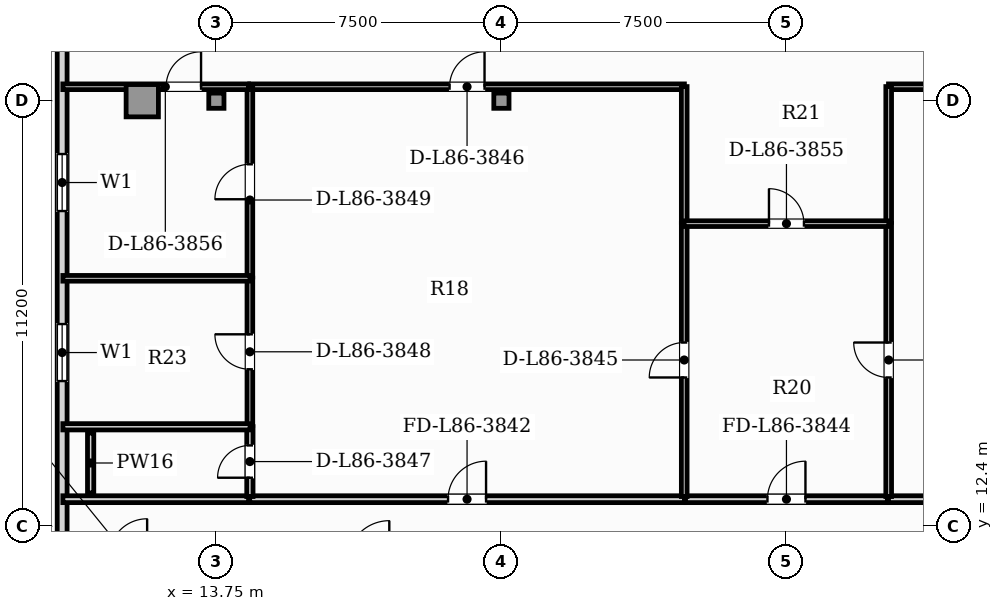
"""IFC4 building model, lengths in metres.
Left out: names, types, materials, properties, quantities, classifications, styles, units other than length and angle.
Written with IfcOpenShell. Run it as: python <this file> out.ifc"""

import sys

from ifc_helpers import new_model, si_unit, direction, frame, frame_2d, origin, origin_2d, place, context, subcontext, project, spatial, rectangle, hollow_rectangle, extrude, element, fill, save


model = new_model("IFC4")
c1 = context("Model", 3, precision=1e-05, world=origin(), true_north=direction((0.0, 1.0)))
c2 = subcontext(c1, "Body", "Model", "MODEL_VIEW")
j1 = project(units=[si_unit("LENGTHUNIT", "METRE"), si_unit("PLANEANGLEUNIT", "RADIAN")], contexts=[c1])
p1 = place(None, origin())
s1 = spatial("IfcSite", under=j1, at=p1, CompositionType="ELEMENT")
p2 = place(p1, origin())
s2 = spatial("IfcBuilding", under=s1, at=p2, CompositionType="ELEMENT")
p3 = place(p2, frame((0.0, 0.0, 349.05)))
s3 = spatial("IfcBuildingStorey", under=s2, at=p3, CompositionType="ELEMENT", Elevation=349.05)
p4 = place(p3, frame((11.8, 23.6, 0.0), z_axis=(0.0, 0.0, 1.0), x_axis=(1.0, 0.0, 0.0)))
e1 = element("IfcColumn", 1, at=p4, inside=s3, PredefinedType="USERDEFINED", context=c2, shape_type="SweptSolid", body=[
    extrude(hollow_rectangle(XDim=0.85, YDim=0.85, WallThickness=0.05, at=origin_2d()), origin(), (0.0, 0.0, 1.0), 4.4),
])
for number, where, z_axis, x_axis in (
    (2, (13.75, 23.6, 0.0), (0.0, 0.0, 1.0), (1.0, 0.0, 0.0)),
    (3, (21.25, 23.6, 0.0), (0.0, 0.0, 1.0), (1.0, 0.0, 0.0)),
):
    element("IfcColumn", number, at=place(p3, frame(where, z_axis=z_axis, x_axis=x_axis)), inside=s3, PredefinedType="COLUMN", context=c2, shape_type="SweptSolid", body=[
        extrude(hollow_rectangle(XDim=0.4, YDim=0.4, WallThickness=0.02, at=origin_2d()), origin(), (0.0, 0.0, 1.0), 4.4),
    ])
p5 = place(p3, frame((9.692, 27.997, 0.0), z_axis=(0.0, 0.0, 1.0), x_axis=(0.0, -1.0, 0.0)))
e4 = element("IfcWall", 4, at=p5, inside=s3, PredefinedType="SOLIDWALL", context=c2, shape_type="SweptSolid", body=[
    extrude(rectangle(XDim=24.757, YDim=0.26, at=frame_2d((12.378, 0.0))), origin(), (0.0, 0.0, 1.0), 4.14),
])
p6 = place(p5, frame((18.707, 0.0, 0.85)))
e5 = element("IfcOpeningElement", 5, at=p6, cuts=e4, PredefinedType="OPENING", context=c2, shape_type="SweptSolid", body=[
    extrude(rectangle(XDim=2.4, YDim=2.0, at=frame_2d((1.2, 1.0))), frame((0.0, 0.14, 0.0), z_axis=(0.0, -1.0, 0.0), x_axis=(1.0, 0.0, 0.0)), (0.0, 0.0, 1.0), 0.28),
])
p7 = place(p5, frame((10.273, 0.0, 0.9)))
e6 = element("IfcOpeningElement", 6, at=p7, cuts=e4, PredefinedType="OPENING", context=c2, shape_type="SweptSolid", body=[
    extrude(rectangle(XDim=1.5, YDim=1.95, at=frame_2d((0.75, 0.975))), frame((0.0, 0.14, 0.0), z_axis=(0.0, -1.0, 0.0), x_axis=(1.0, 0.0, 0.0)), (0.0, 0.0, 1.0), 0.28),
])
p8 = place(p5, frame((5.8, 0.0, 0.9)))
e7 = element("IfcOpeningElement", 7, at=p8, cuts=e4, PredefinedType="OPENING", context=c2, shape_type="SweptSolid", body=[
    extrude(rectangle(XDim=1.5, YDim=1.95, at=frame_2d((0.75, 0.975))), frame((0.0, 0.14, 0.0), z_axis=(0.0, -1.0, 0.0), x_axis=(1.0, 0.0, 0.0)), (0.0, 0.0, 1.0), 0.28),
])
p9 = place(p3, frame((14.627, 13.115, 0.0), z_axis=(0.0, 0.0, 1.0), x_axis=(1.0, 0.0, 0.0)))
e8 = element("IfcWall", 8, at=p9, inside=s3, PredefinedType="PARTITIONING", context=c2, shape_type="SweptSolid", body=[
    extrude(rectangle(XDim=11.438, YDim=0.18, at=frame_2d((5.719, 0.0))), origin(), (0.0, 0.0, 1.0), 4.14),
])
p10 = place(p9, frame((5.219, 0.0, 0.0)))
e9 = element("IfcOpeningElement", 9, at=p10, cuts=e8, PredefinedType="OPENING", context=c2, shape_type="SweptSolid", body=[
    extrude(rectangle(XDim=1.0, YDim=2.15, at=frame_2d((0.5, 1.075))), frame((0.0, 0.1, 0.0), z_axis=(0.0, -1.0, 0.0), x_axis=(1.0, 0.0, 0.0)), (0.0, 0.0, 1.0), 0.2),
])
p11 = place(p3, frame((31.435, 13.115, 0.0), z_axis=(0.0, 0.0, 1.0), x_axis=(1.0, 0.0, 0.0)))
e10 = element("IfcWall", 10, at=p11, inside=s3, PredefinedType="PARTITIONING", context=c2, shape_type="SweptSolid", body=[
    extrude(rectangle(XDim=11.438, YDim=0.18, at=frame_2d((5.719, 0.0))), origin(), (0.0, 0.0, 1.0), 4.14),
])
p12 = place(p11, frame((5.219, 0.0, 0.0)))
e11 = element("IfcOpeningElement", 11, at=p12, cuts=e10, PredefinedType="OPENING", context=c2, shape_type="SweptSolid", body=[
    extrude(rectangle(XDim=1.0, YDim=2.15, at=frame_2d((0.5, 1.075))), frame((0.0, 0.1, 0.0), z_axis=(0.0, -1.0, 0.0), x_axis=(1.0, 0.0, 0.0)), (0.0, 0.0, 1.0), 0.2),
])
p13 = place(p3, frame((26.095, 13.115, 0.0), z_axis=(0.0, 0.0, 1.0), x_axis=(1.0, 0.0, 0.0)))
e12 = element("IfcWall", 12, at=p13, inside=s3, PredefinedType="PARTITIONING", context=c2, shape_type="SweptSolid", body=[
    extrude(rectangle(XDim=5.31, YDim=0.18, at=frame_2d((2.655, 0.0))), origin(), (0.0, 0.0, 1.0), 4.14),
])
p14 = place(p13, frame((2.155, 0.0, 0.0)))
e13 = element("IfcOpeningElement", 13, at=p14, cuts=e12, PredefinedType="OPENING", context=c2, shape_type="SweptSolid", body=[
    extrude(rectangle(XDim=1.0, YDim=2.15, at=frame_2d((0.5, 1.075))), frame((0.0, 0.1, 0.0), z_axis=(0.0, -1.0, 0.0), x_axis=(1.0, 0.0, 0.0)), (0.0, 0.0, 1.0), 0.2),
])
p15 = place(p3, frame((9.711, 13.115, 0.0), z_axis=(0.0, 0.0, 1.0), x_axis=(1.0, 0.0, 0.0)))
e14 = element("IfcWall", 14, at=p15, inside=s3, PredefinedType="PARTITIONING", context=c2, shape_type="SweptSolid", body=[
    extrude(rectangle(XDim=4.885, YDim=0.18, at=frame_2d((2.443, 0.0))), origin(), (0.0, 0.0, 1.0), 4.14),
])
p16 = place(p3, frame((26.06, 13.185, 0.0), z_axis=(0.0, 0.0, 1.0), x_axis=(0.0, 1.0, 0.0)))
e15 = element("IfcWall", 15, at=p16, inside=s3, PredefinedType="PARTITIONING", context=c2, shape_type="SweptSolid", body=[
    extrude(rectangle(XDim=7.185, YDim=0.15, at=frame_2d((3.593, 0.0))), origin(), (0.0, 0.0, 1.0), 4.14),
])
p17 = place(p16, frame((3.133, 0.0, 0.0)))
e16 = element("IfcOpeningElement", 16, at=p17, cuts=e15, PredefinedType="OPENING", context=c2, shape_type="SweptSolid", body=[
    extrude(rectangle(XDim=0.92, YDim=2.1, at=frame_2d((0.46, 1.05))), frame((0.0, 0.085, 0.0), z_axis=(0.0, -1.0, 0.0), x_axis=(1.0, 0.0, 0.0)), (0.0, 0.0, 1.0), 0.17),
])
p18 = place(p3, frame((14.627, 23.967, 0.0), z_axis=(0.0, 0.0, 1.0), x_axis=(1.0, 0.0, 0.0)))
e17 = element("IfcWall", 17, at=p18, inside=s3, PredefinedType="PARTITIONING", context=c2, shape_type="SweptSolid", body=[
    extrude(rectangle(XDim=11.438, YDim=0.15, at=frame_2d((5.719, 0.0))), origin(), (0.0, 0.0, 1.0), 4.14),
])
p19 = place(p18, frame((5.259, 0.0, 0.0)))
e18 = element("IfcOpeningElement", 18, at=p19, cuts=e17, PredefinedType="OPENING", context=c2, shape_type="SweptSolid", body=[
    extrude(rectangle(XDim=0.92, YDim=2.1, at=frame_2d((0.46, 1.05))), frame((0.0, 0.085, 0.0), z_axis=(0.0, -1.0, 0.0), x_axis=(1.0, 0.0, 0.0)), (0.0, 0.0, 1.0), 0.17),
])
p20 = place(p3, frame((26.06, 20.4, 0.0), z_axis=(0.0, 0.0, 1.0), x_axis=(0.0, 1.0, 0.0)))
e19 = element("IfcWall", 19, at=p20, inside=s3, PredefinedType="PARTITIONING", context=c2, shape_type="SweptSolid", body=[
    extrude(rectangle(XDim=3.572, YDim=0.15, at=frame_2d((1.786, 0.0))), origin(), (0.0, 0.0, 1.0), 4.14),
])
p21 = place(p3, frame((14.632, 13.185, 0.0), z_axis=(0.0, 0.0, 1.0), x_axis=(0.0, 1.0, 0.0)))
e20 = element("IfcWall", 20, at=p21, inside=s3, PredefinedType="PLUMBINGWALL", context=c2, shape_type="SweptSolid", body=[
    extrude(rectangle(XDim=1.84, YDim=0.165, at=frame_2d((0.92, 0.0))), origin(), (0.0, 0.0, 1.0), 4.14),
])
p22 = place(p21, frame((0.495, 0.0, 0.0)))
e21 = element("IfcOpeningElement", 21, at=p22, cuts=e20, PredefinedType="OPENING", context=c2, shape_type="SweptSolid", body=[
    extrude(rectangle(XDim=0.85, YDim=2.1, at=frame_2d((0.425, 1.05))), frame((0.0, 0.093, 0.0), z_axis=(0.0, -1.0, 0.0), x_axis=(1.0, 0.0, 0.0)), (0.0, 0.0, 1.0), 0.185),
])
p23 = place(p3, frame((14.632, 15.055, 0.0), z_axis=(0.0, 0.0, 1.0), x_axis=(0.0, 1.0, 0.0)))
e22 = element("IfcWall", 22, at=p23, inside=s3, PredefinedType="PARTITIONING", context=c2, shape_type="SweptSolid", body=[
    extrude(rectangle(XDim=3.877, YDim=0.15, at=frame_2d((1.938, 0.0))), origin(), (0.0, 0.0, 1.0), 4.14),
])
p24 = place(p23, frame((1.479, 0.0, 0.0)))
e23 = element("IfcOpeningElement", 23, at=p24, cuts=e22, PredefinedType="OPENING", context=c2, shape_type="SweptSolid", body=[
    extrude(rectangle(XDim=0.92, YDim=2.1, at=frame_2d((0.46, 1.05))), frame((0.0, 0.085, 0.0), z_axis=(0.0, -1.0, 0.0), x_axis=(1.0, 0.0, 0.0)), (0.0, 0.0, 1.0), 0.17),
])
p25 = place(p3, frame((14.632, 18.962, 0.0), z_axis=(0.0, 0.0, 1.0), x_axis=(0.0, 1.0, 0.0)))
e24 = element("IfcWall", 24, at=p25, inside=s3, PredefinedType="PARTITIONING", context=c2, shape_type="SweptSolid", body=[
    extrude(rectangle(XDim=5.01, YDim=0.15, at=frame_2d((2.505, 0.0))), origin(), (0.0, 0.0, 1.0), 4.14),
])
p26 = place(p25, frame((2.045, 0.0, 0.0)))
e25 = element("IfcOpeningElement", 25, at=p26, cuts=e24, PredefinedType="OPENING", context=c2, shape_type="SweptSolid", body=[
    extrude(rectangle(XDim=0.92, YDim=2.1, at=frame_2d((0.46, 1.05))), frame((0.0, 0.085, 0.0), z_axis=(0.0, -1.0, 0.0), x_axis=(1.0, 0.0, 0.0)), (0.0, 0.0, 1.0), 0.17),
])
p27 = place(p3, frame((31.44, 13.185, 0.0), z_axis=(0.0, 0.0, 1.0), x_axis=(0.0, 1.0, 0.0)))
e26 = element("IfcWall", 26, at=p27, inside=s3, PredefinedType="PARTITIONING", context=c2, shape_type="SweptSolid", body=[
    extrude(rectangle(XDim=7.185, YDim=0.15, at=frame_2d((3.593, 0.0))), origin(), (0.0, 0.0, 1.0), 4.14),
])
p28 = place(p27, frame((3.133, 0.0, 0.0)))
e27 = element("IfcOpeningElement", 27, at=p28, cuts=e26, PredefinedType="OPENING", context=c2, shape_type="SweptSolid", body=[
    extrude(rectangle(XDim=0.92, YDim=2.1, at=frame_2d((0.46, 1.05))), frame((0.0, 0.085, 0.0), z_axis=(0.0, -1.0, 0.0), x_axis=(1.0, 0.0, 0.0)), (0.0, 0.0, 1.0), 0.17),
])
p29 = place(p3, frame((31.435, 23.967, 0.0), z_axis=(0.0, 0.0, 1.0), x_axis=(1.0, 0.0, 0.0)))
e28 = element("IfcWall", 28, at=p29, inside=s3, PredefinedType="PARTITIONING", context=c2, shape_type="SweptSolid", body=[
    extrude(rectangle(XDim=11.438, YDim=0.15, at=frame_2d((5.719, 0.0))), origin(), (0.0, 0.0, 1.0), 4.14),
])
p30 = place(p29, frame((5.259, 0.0, 0.0)))
e29 = element("IfcOpeningElement", 29, at=p30, cuts=e28, PredefinedType="OPENING", context=c2, shape_type="SweptSolid", body=[
    extrude(rectangle(XDim=0.92, YDim=2.1, at=frame_2d((0.46, 1.05))), frame((0.0, 0.085, 0.0), z_axis=(0.0, -1.0, 0.0), x_axis=(1.0, 0.0, 0.0)), (0.0, 0.0, 1.0), 0.17),
])
p31 = place(p3, frame((31.44, 20.4, 0.0), z_axis=(0.0, 0.0, 1.0), x_axis=(0.0, 1.0, 0.0)))
e30 = element("IfcWall", 30, at=p31, inside=s3, PredefinedType="PARTITIONING", context=c2, shape_type="SweptSolid", body=[
    extrude(rectangle(XDim=3.572, YDim=0.15, at=frame_2d((1.786, 0.0))), origin(), (0.0, 0.0, 1.0), 4.14),
])
p32 = place(p3, frame((26.055, 20.365, 0.0), z_axis=(0.0, 0.0, 1.0), x_axis=(1.0, 0.0, 0.0)))
e31 = element("IfcWall", 31, at=p32, inside=s3, PredefinedType="PARTITIONING", context=c2, shape_type="SweptSolid", body=[
    extrude(rectangle(XDim=5.39, YDim=0.15, at=frame_2d((2.695, 0.0))), origin(), (0.0, 0.0, 1.0), 4.14),
])
p33 = place(p32, frame((2.235, 0.0, 0.0)))
e32 = element("IfcOpeningElement", 32, at=p33, cuts=e31, PredefinedType="OPENING", context=c2, shape_type="SweptSolid", body=[
    extrude(rectangle(XDim=0.92, YDim=2.1, at=frame_2d((0.46, 1.05))), frame((0.0, 0.085, 0.0), z_axis=(0.0, -1.0, 0.0), x_axis=(1.0, 0.0, 0.0)), (0.0, 0.0, 1.0), 0.17),
])
p34 = place(p3, frame((9.711, 23.967, 0.0), z_axis=(0.0, 0.0, 1.0), x_axis=(1.0, 0.0, 0.0)))
e33 = element("IfcWall", 33, at=p34, inside=s3, PredefinedType="PARTITIONING", context=c2, shape_type="SweptSolid", body=[
    extrude(rectangle(XDim=4.885, YDim=0.15, at=frame_2d((2.443, 0.0))), origin(), (0.0, 0.0, 1.0), 4.14),
])
p35 = place(p34, frame((2.716, 0.0, 0.0)))
e34 = element("IfcOpeningElement", 34, at=p35, cuts=e33, PredefinedType="OPENING", context=c2, shape_type="SweptSolid", body=[
    extrude(rectangle(XDim=0.92, YDim=2.1, at=frame_2d((0.46, 1.05))), frame((0.0, 0.085, 0.0), z_axis=(0.0, -1.0, 0.0), x_axis=(1.0, 0.0, 0.0)), (0.0, 0.0, 1.0), 0.17),
])
p36 = place(p3, frame((9.711, 15.02, 0.0), z_axis=(0.0, 0.0, 1.0), x_axis=(1.0, 0.0, 0.0)))
e35 = element("IfcWall", 35, at=p36, inside=s3, PredefinedType="PLUMBINGWALL", context=c2, shape_type="SweptSolid", body=[
    extrude(rectangle(XDim=4.926, YDim=0.165, at=frame_2d((2.463, 0.0))), origin(), (0.0, 0.0, 1.0), 4.14),
])
p37 = place(p3, frame((9.711, 18.927, 0.0), z_axis=(0.0, 0.0, 1.0), x_axis=(1.0, 0.0, 0.0)))
e36 = element("IfcWall", 36, at=p37, inside=s3, PredefinedType="PARTITIONING", context=c2, shape_type="SweptSolid", body=[
    extrude(rectangle(XDim=4.926, YDim=0.15, at=frame_2d((2.463, 0.0))), origin(), (0.0, 0.0, 1.0), 4.14),
])
p38 = place(p3, frame((10.442, 13.28, 0.0), z_axis=(0.0, 0.0, 1.0), x_axis=(0.0, 1.0, 0.0)))
e37 = element("IfcWall", 37, at=p38, inside=s3, PredefinedType="PLUMBINGWALL", context=c2, shape_type="SweptSolid", body=[
    extrude(rectangle(XDim=1.575, YDim=0.165, at=frame_2d((0.788, 0.0))), origin(), (0.0, 0.0, 1.0), 4.14),
])
p39 = place(p7, origin())
e38 = element("IfcWindow", 38, at=p39, inside=s3, PartitioningType="SINGLE_PANEL", PredefinedType="WINDOW", context=c2, shape_type="SweptSolid", body=[
    extrude(rectangle(XDim=1.5, YDim=1.95, at=frame_2d((0.75, 0.975))), frame((0.0, 0.03, 0.0), z_axis=(0.0, -1.0, 0.0), x_axis=(1.0, 0.0, 0.0)), (0.0, 0.0, 1.0), 0.06),
])
fill(e6, e38)
p40 = place(p8, origin())
e39 = element("IfcWindow", 39, at=p40, inside=s3, PartitioningType="SINGLE_PANEL", PredefinedType="WINDOW", context=c2, shape_type="SweptSolid", body=[
    extrude(rectangle(XDim=1.5, YDim=1.95, at=frame_2d((0.75, 0.975))), frame((0.0, 0.03, 0.0), z_axis=(0.0, -1.0, 0.0), x_axis=(1.0, 0.0, 0.0)), (0.0, 0.0, 1.0), 0.06),
])
fill(e7, e39)
p41 = place(p10, origin())
e40 = element("IfcDoor", 40, at=p41, inside=s3, OperationType="SINGLE_SWING_RIGHT", PredefinedType="DOOR", context=c2, shape_type="SweptSolid", body=[
    extrude(rectangle(XDim=1.0, YDim=2.15, at=frame_2d((0.5, 1.075))), frame((0.0, 0.025, 0.0), z_axis=(0.0, -1.0, 0.0), x_axis=(1.0, 0.0, 0.0)), (0.0, 0.0, 1.0), 0.05),
])
fill(e9, e40)
p42 = place(p14, origin())
e41 = element("IfcDoor", 41, at=p42, inside=s3, OperationType="SINGLE_SWING_RIGHT", PredefinedType="DOOR", context=c2, shape_type="SweptSolid", body=[
    extrude(rectangle(XDim=1.0, YDim=2.15, at=frame_2d((0.5, 1.075))), frame((0.0, 0.025, 0.0), z_axis=(0.0, -1.0, 0.0), x_axis=(1.0, 0.0, 0.0)), (0.0, 0.0, 1.0), 0.05),
])
fill(e13, e41)
p43 = place(p17, origin())
e42 = element("IfcDoor", 42, at=p43, inside=s3, OperationType="SINGLE_SWING_LEFT", PredefinedType="DOOR", context=c2, shape_type="SweptSolid", body=[
    extrude(rectangle(XDim=0.92, YDim=2.1, at=frame_2d((0.46, 1.05))), frame((0.0, 0.025, 0.0), z_axis=(0.0, -1.0, 0.0), x_axis=(1.0, 0.0, 0.0)), (0.0, 0.0, 1.0), 0.05),
])
fill(e16, e42)
p44 = place(p19, origin())
e43 = element("IfcDoor", 43, at=p44, inside=s3, OperationType="SINGLE_SWING_RIGHT", PredefinedType="DOOR", context=c2, shape_type="SweptSolid", body=[
    extrude(rectangle(XDim=0.92, YDim=2.1, at=frame_2d((0.46, 1.05))), frame((0.0, 0.025, 0.0), z_axis=(0.0, -1.0, 0.0), x_axis=(1.0, 0.0, 0.0)), (0.0, 0.0, 1.0), 0.05),
])
fill(e18, e43)
p45 = place(p22, origin())
e44 = element("IfcDoor", 44, at=p45, inside=s3, OperationType="SINGLE_SWING_LEFT", PredefinedType="DOOR", context=c2, shape_type="SweptSolid", body=[
    extrude(rectangle(XDim=0.85, YDim=2.1, at=frame_2d((0.425, 1.05))), frame((0.0, 0.025, 0.0), z_axis=(0.0, -1.0, 0.0), x_axis=(1.0, 0.0, 0.0)), (0.0, 0.0, 1.0), 0.05),
])
fill(e21, e44)
p46 = place(p24, origin())
e45 = element("IfcDoor", 45, at=p46, inside=s3, OperationType="SINGLE_SWING_RIGHT", PredefinedType="DOOR", context=c2, shape_type="SweptSolid", body=[
    extrude(rectangle(XDim=0.92, YDim=2.1, at=frame_2d((0.46, 1.05))), frame((0.0, 0.025, 0.0), z_axis=(0.0, -1.0, 0.0), x_axis=(1.0, 0.0, 0.0)), (0.0, 0.0, 1.0), 0.05),
])
fill(e23, e45)
p47 = place(p26, origin())
e46 = element("IfcDoor", 46, at=p47, inside=s3, OperationType="SINGLE_SWING_LEFT", PredefinedType="DOOR", context=c2, shape_type="SweptSolid", body=[
    extrude(rectangle(XDim=0.92, YDim=2.1, at=frame_2d((0.46, 1.05))), frame((0.0, 0.025, 0.0), z_axis=(0.0, -1.0, 0.0), x_axis=(1.0, 0.0, 0.0)), (0.0, 0.0, 1.0), 0.05),
])
fill(e25, e46)
p48 = place(p28, origin())
e47 = element("IfcDoor", 47, at=p48, inside=s3, OperationType="SINGLE_SWING_RIGHT", PredefinedType="DOOR", context=c2, shape_type="SweptSolid", body=[
    extrude(rectangle(XDim=0.92, YDim=2.1, at=frame_2d((0.46, 1.05))), frame((0.0, 0.025, 0.0), z_axis=(0.0, -1.0, 0.0), x_axis=(1.0, 0.0, 0.0)), (0.0, 0.0, 1.0), 0.05),
])
fill(e27, e47)
p49 = place(p33, origin())
e48 = element("IfcDoor", 48, at=p49, inside=s3, OperationType="SINGLE_SWING_LEFT", PredefinedType="DOOR", context=c2, shape_type="SweptSolid", body=[
    extrude(rectangle(XDim=0.92, YDim=2.1, at=frame_2d((0.46, 1.05))), frame((0.0, 0.025, 0.0), z_axis=(0.0, -1.0, 0.0), x_axis=(1.0, 0.0, 0.0)), (0.0, 0.0, 1.0), 0.05),
])
fill(e32, e48)
p50 = place(p35, origin())
e49 = element("IfcDoor", 49, at=p50, inside=s3, OperationType="SINGLE_SWING_RIGHT", PredefinedType="DOOR", context=c2, shape_type="SweptSolid", body=[
    extrude(rectangle(XDim=0.92, YDim=2.1, at=frame_2d((0.46, 1.05))), frame((0.0, 0.025, 0.0), z_axis=(0.0, -1.0, 0.0), x_axis=(1.0, 0.0, 0.0)), (0.0, 0.0, 1.0), 0.05),
])
fill(e34, e49)
save(model, sys.argv[1])
